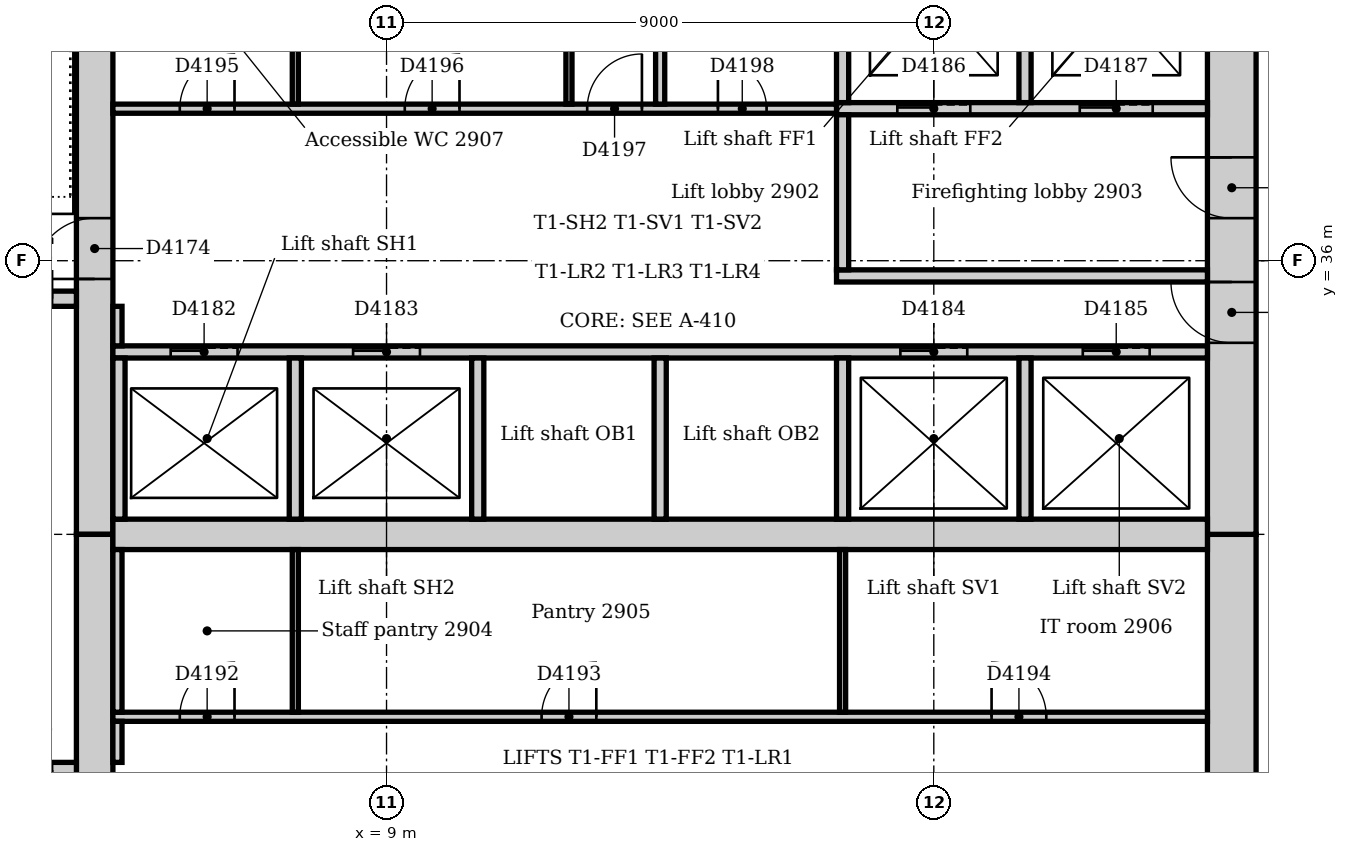
"""IFC4 building model, lengths in metres.
Left out: names, types, materials, properties, quantities, classifications, styles, units other than length and angle.
Written with IfcOpenShell. Run it as: python <this file> out.ifc"""

import sys

from ifc_helpers import new_model, si_unit, direction, frame, frame_2d, origin, place, context, subcontext, project, spatial, rectangle, extrude, element, fill, save


model = new_model("IFC4")
c1 = context("Model", 3, precision=1e-05, world=origin(), true_north=direction((0.0, 1.0)))
c2 = subcontext(c1, "Body", "Model", "MODEL_VIEW")
j1 = project(units=[si_unit("LENGTHUNIT", "METRE"), si_unit("PLANEANGLEUNIT", "RADIAN")], contexts=[c1])
p1 = place(None, origin())
s1 = spatial("IfcSite", under=j1, at=p1, CompositionType="ELEMENT")
p2 = place(p1, origin())
s2 = spatial("IfcBuilding", under=s1, at=p2, CompositionType="ELEMENT")
p3 = place(p2, frame((0.0, 0.0, 124.0)))
s3 = spatial("IfcBuildingStorey", under=s2, at=p3, CompositionType="ELEMENT", Elevation=124.0)
p4 = place(p3, frame((22.9, 21.0, 0.0), z_axis=(0.0, 0.0, 1.0), x_axis=(0.0, 1.0, 0.0)))
e1 = element("IfcWall", 1, at=p4, inside=s3, PredefinedType="SOLIDWALL", context=c2, shape_type="SweptSolid", body=[
    extrude(rectangle(XDim=10.5, YDim=0.8, at=frame_2d((5.25, 0.0))), origin(), (0.0, 0.0, 1.0), 4.0),
])
p5 = place(p4, frame((4.35, 0.0, 0.0)))
e2 = element("IfcOpeningElement", 2, at=p5, cuts=e1, PredefinedType="OPENING", context=c2, shape_type="SweptSolid", body=[
    extrude(rectangle(XDim=1.8, YDim=2.1, at=frame_2d((0.9, 1.05))), frame((0.0, 0.41, 0.0), z_axis=(0.0, -1.0, 0.0), x_axis=(1.0, 0.0, 0.0)), (0.0, 0.0, 1.0), 0.82),
])
p6 = place(p3, frame((22.9, 31.5, 0.0), z_axis=(0.0, 0.0, 1.0), x_axis=(0.0, 1.0, 0.0)))
e3 = element("IfcWall", 3, at=p6, inside=s3, PredefinedType="SOLIDWALL", context=c2, shape_type="SweptSolid", body=[
    extrude(rectangle(XDim=10.5, YDim=0.8, at=frame_2d((5.25, 0.0))), origin(), (0.0, 0.0, 1.0), 4.0),
])
p7 = place(p6, frame((3.15, 0.0, 0.0)))
e4 = element("IfcOpeningElement", 4, at=p7, cuts=e3, PredefinedType="OPENING", context=c2, shape_type="SweptSolid", body=[
    extrude(rectangle(XDim=1.0, YDim=2.1, at=frame_2d((0.5, 1.05))), frame((0.0, 0.41, 0.0), z_axis=(0.0, -1.0, 0.0), x_axis=(1.0, 0.0, 0.0)), (0.0, 0.0, 1.0), 0.82),
])
p8 = place(p6, frame((5.2, 0.0, 0.0)))
e5 = element("IfcOpeningElement", 5, at=p8, cuts=e3, PredefinedType="OPENING", context=c2, shape_type="SweptSolid", body=[
    extrude(rectangle(XDim=1.0, YDim=2.1, at=frame_2d((0.5, 1.05))), frame((0.0, 0.41, 0.0), z_axis=(0.0, -1.0, 0.0), x_axis=(1.0, 0.0, 0.0)), (0.0, 0.0, 1.0), 0.82),
])
p9 = place(p3, frame((4.2, 42.0, 0.0), z_axis=(0.0, 0.0, 1.0), x_axis=(0.0, -1.0, 0.0)))
e6 = element("IfcWall", 6, at=p9, inside=s3, PredefinedType="SOLIDWALL", context=c2, shape_type="SweptSolid", body=[
    extrude(rectangle(XDim=10.5, YDim=0.6, at=frame_2d((5.25, 0.0))), origin(), (0.0, 0.0, 1.0), 4.0),
])
p10 = place(p9, frame((5.3, 0.0, 0.0)))
e7 = element("IfcOpeningElement", 7, at=p10, cuts=e6, PredefinedType="OPENING", context=c2, shape_type="SweptSolid", body=[
    extrude(rectangle(XDim=1.0, YDim=2.1, at=frame_2d((0.5, 1.05))), frame((0.0, 0.31, 0.0), z_axis=(0.0, -1.0, 0.0), x_axis=(1.0, 0.0, 0.0)), (0.0, 0.0, 1.0), 0.62),
])
p11 = place(p3, frame((4.2, 31.5, 0.0), z_axis=(0.0, 0.0, 1.0), x_axis=(0.0, -1.0, 0.0)))
e8 = element("IfcWall", 8, at=p11, inside=s3, PredefinedType="SOLIDWALL", context=c2, shape_type="SweptSolid", body=[
    extrude(rectangle(XDim=10.5, YDim=0.6, at=frame_2d((5.25, 0.0))), origin(), (0.0, 0.0, 1.0), 4.0),
])
p12 = place(p11, frame((4.25, 0.0, 0.0)))
e9 = element("IfcOpeningElement", 9, at=p12, cuts=e8, PredefinedType="OPENING", context=c2, shape_type="SweptSolid", body=[
    extrude(rectangle(XDim=1.0, YDim=2.1, at=frame_2d((0.5, 1.05))), frame((0.0, 0.31, 0.0), z_axis=(0.0, -1.0, 0.0), x_axis=(1.0, 0.0, 0.0)), (0.0, 0.0, 1.0), 0.62),
])
p13 = place(p3, frame((4.5, 31.5, 0.0), z_axis=(0.0, 0.0, 1.0), x_axis=(1.0, 0.0, 0.0)))
e10 = element("IfcWall", 10, at=p13, inside=s3, PredefinedType="SOLIDWALL", context=c2, shape_type="SweptSolid", body=[
    extrude(rectangle(XDim=18.0, YDim=0.5, at=frame_2d((9.0, 0.0))), origin(), (0.0, 0.0, 1.0), 4.0),
])
p14 = place(p3, frame((3.9, 27.625, 0.0), z_axis=(0.0, 0.0, 1.0), x_axis=(-1.0, 0.0, 0.0)))
e11 = element("IfcWall", 11, at=p14, inside=s3, PredefinedType="SOLIDWALL", context=c2, shape_type="SweptSolid", body=[
    extrude(rectangle(XDim=3.54, YDim=0.25, at=frame_2d((1.77, 0.0))), origin(), (0.0, 0.0, 1.0), 4.0),
])
p15 = place(p14, frame((0.4, 0.0, 0.0)))
e12 = element("IfcOpeningElement", 12, at=p15, cuts=e11, PredefinedType="OPENING", context=c2, shape_type="SweptSolid", body=[
    extrude(rectangle(XDim=1.0, YDim=2.1, at=frame_2d((0.5, 1.05))), frame((0.0, 0.135, 0.0), z_axis=(0.0, -1.0, 0.0), x_axis=(1.0, 0.0, 0.0)), (0.0, 0.0, 1.0), 0.27),
])
p16 = place(p3, frame((0.36, 35.375, 0.0), z_axis=(0.0, 0.0, 1.0), x_axis=(1.0, 0.0, 0.0)))
e13 = element("IfcWall", 13, at=p16, inside=s3, PredefinedType="SOLIDWALL", context=c2, shape_type="SweptSolid", body=[
    extrude(rectangle(XDim=3.54, YDim=0.25, at=frame_2d((1.77, 0.0))), origin(), (0.0, 0.0, 1.0), 4.0),
])
p17 = place(p16, frame((2.14, 0.0, 0.0)))
e14 = element("IfcOpeningElement", 14, at=p17, cuts=e13, PredefinedType="OPENING", context=c2, shape_type="SweptSolid", body=[
    extrude(rectangle(XDim=1.0, YDim=2.1, at=frame_2d((0.5, 1.05))), frame((0.0, 0.135, 0.0), z_axis=(0.0, -1.0, 0.0), x_axis=(1.0, 0.0, 0.0)), (0.0, 0.0, 1.0), 0.27),
])
p18 = place(p3, frame((16.4, 35.75, 0.0), z_axis=(0.0, 0.0, 1.0), x_axis=(1.0, 0.0, 0.0)))
e15 = element("IfcWall", 15, at=p18, inside=s3, PredefinedType="PARTITIONING", context=c2, shape_type="SweptSolid", body=[
    extrude(rectangle(XDim=6.1, YDim=0.2, at=frame_2d((3.05, 0.0))), origin(), (0.0, 0.0, 1.0), 3.85),
])
p19 = place(p3, frame((16.4, 38.5, 0.0), z_axis=(0.0, 0.0, 1.0), x_axis=(1.0, 0.0, 0.0)))
e16 = element("IfcWall", 16, at=p19, inside=s3, PredefinedType="PARTITIONING", context=c2, shape_type="SweptSolid", body=[
    extrude(rectangle(XDim=6.1, YDim=0.2, at=frame_2d((3.05, 0.0))), origin(), (0.0, 0.0, 1.0), 3.85),
])
p20 = place(p19, frame((1.0, 0.0, 0.0)))
e17 = element("IfcOpeningElement", 17, at=p20, cuts=e16, PredefinedType="OPENING", context=c2, shape_type="SweptSolid", body=[
    extrude(rectangle(XDim=1.2, YDim=2.1, at=frame_2d((0.6, 1.05))), frame((0.0, 0.11, 0.0), z_axis=(0.0, -1.0, 0.0), x_axis=(1.0, 0.0, 0.0)), (0.0, 0.0, 1.0), 0.22),
])
p21 = place(p19, frame((4.0, 0.0, 0.0)))
e18 = element("IfcOpeningElement", 18, at=p21, cuts=e16, PredefinedType="OPENING", context=c2, shape_type="SweptSolid", body=[
    extrude(rectangle(XDim=1.2, YDim=2.1, at=frame_2d((0.6, 1.05))), frame((0.0, 0.11, 0.0), z_axis=(0.0, -1.0, 0.0), x_axis=(1.0, 0.0, 0.0)), (0.0, 0.0, 1.0), 0.22),
])
p22 = place(p3, frame((16.5, 35.85, 0.0), z_axis=(0.0, 0.0, 1.0), x_axis=(0.0, 1.0, 0.0)))
e19 = element("IfcWall", 19, at=p22, inside=s3, PredefinedType="PARTITIONING", context=c2, shape_type="SweptSolid", body=[
    extrude(rectangle(XDim=2.55, YDim=0.2, at=frame_2d((1.275, 0.0))), origin(), (0.0, 0.0, 1.0), 3.85),
])
p23 = place(p3, frame((4.5, 34.5, 0.0), z_axis=(0.0, 0.0, 1.0), x_axis=(1.0, 0.0, 0.0)))
e20 = element("IfcWall", 20, at=p23, inside=s3, PredefinedType="PARTITIONING", context=c2, shape_type="SweptSolid", body=[
    extrude(rectangle(XDim=18.0, YDim=0.2, at=frame_2d((9.0, 0.0))), origin(), (0.0, 0.0, 1.0), 3.85),
])
p24 = place(p23, frame((0.95, 0.0, 0.0)))
e21 = element("IfcOpeningElement", 21, at=p24, cuts=e20, PredefinedType="OPENING", context=c2, shape_type="SweptSolid", body=[
    extrude(rectangle(XDim=1.1, YDim=2.1, at=frame_2d((0.55, 1.05))), frame((0.0, 0.11, 0.0), z_axis=(0.0, -1.0, 0.0), x_axis=(1.0, 0.0, 0.0)), (0.0, 0.0, 1.0), 0.22),
])
p25 = place(p23, frame((3.95, 0.0, 0.0)))
e22 = element("IfcOpeningElement", 22, at=p25, cuts=e20, PredefinedType="OPENING", context=c2, shape_type="SweptSolid", body=[
    extrude(rectangle(XDim=1.1, YDim=2.1, at=frame_2d((0.55, 1.05))), frame((0.0, 0.11, 0.0), z_axis=(0.0, -1.0, 0.0), x_axis=(1.0, 0.0, 0.0)), (0.0, 0.0, 1.0), 0.22),
])
p26 = place(p23, frame((12.95, 0.0, 0.0)))
e23 = element("IfcOpeningElement", 23, at=p26, cuts=e20, PredefinedType="OPENING", context=c2, shape_type="SweptSolid", body=[
    extrude(rectangle(XDim=1.1, YDim=2.1, at=frame_2d((0.55, 1.05))), frame((0.0, 0.11, 0.0), z_axis=(0.0, -1.0, 0.0), x_axis=(1.0, 0.0, 0.0)), (0.0, 0.0, 1.0), 0.22),
])
p27 = place(p23, frame((15.95, 0.0, 0.0)))
e24 = element("IfcOpeningElement", 24, at=p27, cuts=e20, PredefinedType="OPENING", context=c2, shape_type="SweptSolid", body=[
    extrude(rectangle(XDim=1.1, YDim=2.1, at=frame_2d((0.55, 1.05))), frame((0.0, 0.11, 0.0), z_axis=(0.0, -1.0, 0.0), x_axis=(1.0, 0.0, 0.0)), (0.0, 0.0, 1.0), 0.22),
])
for number, where, z_axis, x_axis in (
    (25, (16.5, 38.6, 0.0), (0.0, 0.0, 1.0), (0.0, 1.0, 0.0)),
    (26, (19.5, 38.6, 0.0), (0.0, 0.0, 1.0), (0.0, 1.0, 0.0)),
):
    element("IfcWall", number, at=place(p3, frame(where, z_axis=z_axis, x_axis=x_axis)), inside=s3, PredefinedType="PARTITIONING", context=c2, shape_type="SweptSolid", body=[
        extrude(rectangle(XDim=3.4, YDim=0.2, at=frame_2d((1.7, 0.0))), origin(), (0.0, 0.0, 1.0), 3.85),
    ])
for number, where, z_axis, x_axis in (
    (27, (4.6, 31.75, 0.0), (0.0, 0.0, 1.0), (0.0, 1.0, 0.0)),
    (28, (7.5, 31.75, 0.0), (0.0, 0.0, 1.0), (0.0, 1.0, 0.0)),
    (29, (10.5, 31.75, 0.0), (0.0, 0.0, 1.0), (0.0, 1.0, 0.0)),
    (30, (13.5, 31.75, 0.0), (0.0, 0.0, 1.0), (0.0, 1.0, 0.0)),
    (31, (16.5, 31.75, 0.0), (0.0, 0.0, 1.0), (0.0, 1.0, 0.0)),
    (32, (19.5, 31.75, 0.0), (0.0, 0.0, 1.0), (0.0, 1.0, 0.0)),
):
    element("IfcWall", number, at=place(p3, frame(where, z_axis=z_axis, x_axis=x_axis)), inside=s3, PredefinedType="PARTITIONING", context=c2, shape_type="SweptSolid", body=[
        extrude(rectangle(XDim=2.65, YDim=0.2, at=frame_2d((1.325, 0.0))), origin(), (0.0, 0.0, 1.0), 3.85),
    ])
p28 = place(p3, frame((4.5, 28.5, 0.0), z_axis=(0.0, 0.0, 1.0), x_axis=(1.0, 0.0, 0.0)))
e33 = element("IfcWall", 33, at=p28, inside=s3, PredefinedType="PARTITIONING", context=c2, shape_type="SweptSolid", body=[
    extrude(rectangle(XDim=18.0, YDim=0.15, at=frame_2d((9.0, 0.0))), origin(), (0.0, 0.0, 1.0), 3.85),
])
p29 = place(p28, frame((1.1, 0.0, 0.0)))
e34 = element("IfcOpeningElement", 34, at=p29, cuts=e33, PredefinedType="OPENING", context=c2, shape_type="SweptSolid", body=[
    extrude(rectangle(XDim=0.9, YDim=2.1, at=frame_2d((0.45, 1.05))), frame((0.0, 0.085, 0.0), z_axis=(0.0, -1.0, 0.0), x_axis=(1.0, 0.0, 0.0)), (0.0, 0.0, 1.0), 0.17),
])
p30 = place(p28, frame((7.05, 0.0, 0.0)))
e35 = element("IfcOpeningElement", 35, at=p30, cuts=e33, PredefinedType="OPENING", context=c2, shape_type="SweptSolid", body=[
    extrude(rectangle(XDim=0.9, YDim=2.1, at=frame_2d((0.45, 1.05))), frame((0.0, 0.085, 0.0), z_axis=(0.0, -1.0, 0.0), x_axis=(1.0, 0.0, 0.0)), (0.0, 0.0, 1.0), 0.17),
])
p31 = place(p28, frame((14.45, 0.0, 0.0)))
e36 = element("IfcOpeningElement", 36, at=p31, cuts=e33, PredefinedType="OPENING", context=c2, shape_type="SweptSolid", body=[
    extrude(rectangle(XDim=0.9, YDim=2.1, at=frame_2d((0.45, 1.05))), frame((0.0, 0.085, 0.0), z_axis=(0.0, -1.0, 0.0), x_axis=(1.0, 0.0, 0.0)), (0.0, 0.0, 1.0), 0.17),
])
p32 = place(p3, frame((4.5, 38.5, 0.0), z_axis=(0.0, 0.0, 1.0), x_axis=(1.0, 0.0, 0.0)))
e37 = element("IfcWall", 37, at=p32, inside=s3, PredefinedType="PARTITIONING", context=c2, shape_type="SweptSolid", body=[
    extrude(rectangle(XDim=11.9, YDim=0.15, at=frame_2d((5.95, 0.0))), origin(), (0.0, 0.0, 1.0), 3.85),
])
p33 = place(p32, frame((1.1, 0.0, 0.0)))
e38 = element("IfcOpeningElement", 38, at=p33, cuts=e37, PredefinedType="OPENING", context=c2, shape_type="SweptSolid", body=[
    extrude(rectangle(XDim=0.9, YDim=2.1, at=frame_2d((0.45, 1.05))), frame((0.0, 0.085, 0.0), z_axis=(0.0, -1.0, 0.0), x_axis=(1.0, 0.0, 0.0)), (0.0, 0.0, 1.0), 0.17),
])
p34 = place(p32, frame((4.8, 0.0, 0.0)))
e39 = element("IfcOpeningElement", 39, at=p34, cuts=e37, PredefinedType="OPENING", context=c2, shape_type="SweptSolid", body=[
    extrude(rectangle(XDim=0.9, YDim=2.1, at=frame_2d((0.45, 1.05))), frame((0.0, 0.085, 0.0), z_axis=(0.0, -1.0, 0.0), x_axis=(1.0, 0.0, 0.0)), (0.0, 0.0, 1.0), 0.17),
])
p35 = place(p32, frame((7.8, 0.0, 0.0)))
e40 = element("IfcOpeningElement", 40, at=p35, cuts=e37, PredefinedType="OPENING", context=c2, shape_type="SweptSolid", body=[
    extrude(rectangle(XDim=0.9, YDim=2.1, at=frame_2d((0.45, 1.05))), frame((0.0, 0.085, 0.0), z_axis=(0.0, -1.0, 0.0), x_axis=(1.0, 0.0, 0.0)), (0.0, 0.0, 1.0), 0.17),
])
p36 = place(p32, frame((9.95, 0.0, 0.0)))
e41 = element("IfcOpeningElement", 41, at=p36, cuts=e37, PredefinedType="OPENING", context=c2, shape_type="SweptSolid", body=[
    extrude(rectangle(XDim=0.8, YDim=2.1, at=frame_2d((0.4, 1.05))), frame((0.0, 0.085, 0.0), z_axis=(0.0, -1.0, 0.0), x_axis=(1.0, 0.0, 0.0)), (0.0, 0.0, 1.0), 0.17),
])
p37 = place(p3, frame((4.575, 27.75, 0.0), z_axis=(0.0, 0.0, 1.0), x_axis=(0.0, 1.0, 0.0)))
e42 = element("IfcWall", 42, at=p37, inside=s3, PredefinedType="PARTITIONING", context=c2, shape_type="SweptSolid", body=[
    extrude(rectangle(XDim=0.675, YDim=0.15, at=frame_2d((0.338, 0.0))), origin(), (0.0, 0.0, 1.0), 3.85),
])
p38 = place(p3, frame((4.575, 28.575, 0.0), z_axis=(0.0, 0.0, 1.0), x_axis=(0.0, 1.0, 0.0)))
e43 = element("IfcWall", 43, at=p38, inside=s3, PredefinedType="PARTITIONING", context=c2, shape_type="SweptSolid", body=[
    extrude(rectangle(XDim=2.675, YDim=0.15, at=frame_2d((1.337, 0.0))), origin(), (0.0, 0.0, 1.0), 3.85),
])
p39 = place(p3, frame((4.575, 34.6, 0.0), z_axis=(0.0, 0.0, 1.0), x_axis=(0.0, 1.0, 0.0)))
e44 = element("IfcWall", 44, at=p39, inside=s3, PredefinedType="PARTITIONING", context=c2, shape_type="SweptSolid", body=[
    extrude(rectangle(XDim=0.65, YDim=0.15, at=frame_2d((0.325, 0.0))), origin(), (0.0, 0.0, 1.0), 3.85),
])
p40 = place(p3, frame((13.5, 38.575, 0.0), z_axis=(0.0, 0.0, 1.0), x_axis=(0.0, 1.0, 0.0)))
e45 = element("IfcWall", 45, at=p40, inside=s3, PredefinedType="PARTITIONING", context=c2, shape_type="SweptSolid", body=[
    extrude(rectangle(XDim=3.425, YDim=0.15, at=frame_2d((1.712, 0.0))), origin(), (0.0, 0.0, 1.0), 3.85),
])
for number, where, z_axis, x_axis in (
    (46, (7.5, 38.575, 0.0), (0.0, 0.0, 1.0), (0.0, 1.0, 0.0)),
    (47, (12.0, 38.575, 0.0), (0.0, 0.0, 1.0), (0.0, 1.0, 0.0)),
):
    element("IfcWall", number, at=place(p3, frame(where, z_axis=z_axis, x_axis=x_axis)), inside=s3, PredefinedType="PARTITIONING", context=c2, shape_type="SweptSolid", body=[
        extrude(rectangle(XDim=3.425, YDim=0.1, at=frame_2d((1.712, 0.0))), origin(), (0.0, 0.0, 1.0), 3.85),
    ])
for number, where, z_axis, x_axis in (
    (48, (7.5, 28.575, 0.0), (0.0, 0.0, 1.0), (0.0, 1.0, 0.0)),
    (49, (16.5, 28.575, 0.0), (0.0, 0.0, 1.0), (0.0, 1.0, 0.0)),
):
    element("IfcWall", number, at=place(p3, frame(where, z_axis=z_axis, x_axis=x_axis)), inside=s3, PredefinedType="PARTITIONING", context=c2, shape_type="SweptSolid", body=[
        extrude(rectangle(XDim=2.675, YDim=0.1, at=frame_2d((1.337, 0.0))), origin(), (0.0, 0.0, 1.0), 3.85),
    ])
p41 = place(p10, frame((1.0, 0.0, 0.0), z_axis=(0.0, 0.0, 1.0), x_axis=(-1.0, 0.0, 0.0)))
e50 = element("IfcDoor", 50, at=p41, inside=s3, OperationType="SINGLE_SWING_LEFT", PredefinedType="DOOR", context=c2, shape_type="SweptSolid", body=[
    extrude(rectangle(XDim=1.0, YDim=2.1, at=frame_2d((0.5, 1.05))), frame((0.0, 0.025, 0.0), z_axis=(0.0, -1.0, 0.0), x_axis=(1.0, 0.0, 0.0)), (0.0, 0.0, 1.0), 0.05),
])
fill(e7, e50)
p42 = place(p24, origin())
e51 = element("IfcDoor", 51, at=p42, inside=s3, OperationType="SLIDING_TO_LEFT", PredefinedType="DOOR", context=c2, shape_type="SweptSolid", body=[
    extrude(rectangle(XDim=1.1, YDim=2.1, at=frame_2d((0.55, 1.05))), frame((0.0, 0.025, 0.0), z_axis=(0.0, -1.0, 0.0), x_axis=(1.0, 0.0, 0.0)), (0.0, 0.0, 1.0), 0.05),
])
fill(e21, e51)
p43 = place(p25, origin())
e52 = element("IfcDoor", 52, at=p43, inside=s3, OperationType="SLIDING_TO_LEFT", PredefinedType="DOOR", context=c2, shape_type="SweptSolid", body=[
    extrude(rectangle(XDim=1.1, YDim=2.1, at=frame_2d((0.55, 1.05))), frame((0.0, 0.025, 0.0), z_axis=(0.0, -1.0, 0.0), x_axis=(1.0, 0.0, 0.0)), (0.0, 0.0, 1.0), 0.05),
])
fill(e22, e52)
p44 = place(p26, origin())
e53 = element("IfcDoor", 53, at=p44, inside=s3, OperationType="SLIDING_TO_LEFT", PredefinedType="DOOR", context=c2, shape_type="SweptSolid", body=[
    extrude(rectangle(XDim=1.1, YDim=2.1, at=frame_2d((0.55, 1.05))), frame((0.0, 0.025, 0.0), z_axis=(0.0, -1.0, 0.0), x_axis=(1.0, 0.0, 0.0)), (0.0, 0.0, 1.0), 0.05),
])
fill(e23, e53)
p45 = place(p27, origin())
e54 = element("IfcDoor", 54, at=p45, inside=s3, OperationType="SLIDING_TO_LEFT", PredefinedType="DOOR", context=c2, shape_type="SweptSolid", body=[
    extrude(rectangle(XDim=1.1, YDim=2.1, at=frame_2d((0.55, 1.05))), frame((0.0, 0.025, 0.0), z_axis=(0.0, -1.0, 0.0), x_axis=(1.0, 0.0, 0.0)), (0.0, 0.0, 1.0), 0.05),
])
fill(e24, e54)
p46 = place(p20, origin())
e55 = element("IfcDoor", 55, at=p46, inside=s3, OperationType="SLIDING_TO_LEFT", PredefinedType="DOOR", context=c2, shape_type="SweptSolid", body=[
    extrude(rectangle(XDim=1.2, YDim=2.1, at=frame_2d((0.6, 1.05))), frame((0.0, 0.025, 0.0), z_axis=(0.0, -1.0, 0.0), x_axis=(1.0, 0.0, 0.0)), (0.0, 0.0, 1.0), 0.05),
])
fill(e17, e55)
p47 = place(p21, origin())
e56 = element("IfcDoor", 56, at=p47, inside=s3, OperationType="SLIDING_TO_LEFT", PredefinedType="DOOR", context=c2, shape_type="SweptSolid", body=[
    extrude(rectangle(XDim=1.2, YDim=2.1, at=frame_2d((0.6, 1.05))), frame((0.0, 0.025, 0.0), z_axis=(0.0, -1.0, 0.0), x_axis=(1.0, 0.0, 0.0)), (0.0, 0.0, 1.0), 0.05),
])
fill(e18, e56)
p48 = place(p7, origin())
e57 = element("IfcDoor", 57, at=p48, inside=s3, OperationType="SINGLE_SWING_RIGHT", PredefinedType="DOOR", context=c2, shape_type="SweptSolid", body=[
    extrude(rectangle(XDim=1.0, YDim=2.1, at=frame_2d((0.5, 1.05))), frame((0.0, 0.025, 0.0), z_axis=(0.0, -1.0, 0.0), x_axis=(1.0, 0.0, 0.0)), (0.0, 0.0, 1.0), 0.05),
])
fill(e4, e57)
p49 = place(p8, origin())
e58 = element("IfcDoor", 58, at=p49, inside=s3, OperationType="SINGLE_SWING_RIGHT", PredefinedType="DOOR", context=c2, shape_type="SweptSolid", body=[
    extrude(rectangle(XDim=1.0, YDim=2.1, at=frame_2d((0.5, 1.05))), frame((0.0, 0.025, 0.0), z_axis=(0.0, -1.0, 0.0), x_axis=(1.0, 0.0, 0.0)), (0.0, 0.0, 1.0), 0.05),
])
fill(e5, e58)
p50 = place(p29, origin())
e59 = element("IfcDoor", 59, at=p50, inside=s3, OperationType="SINGLE_SWING_RIGHT", PredefinedType="DOOR", context=c2, shape_type="SweptSolid", body=[
    extrude(rectangle(XDim=0.9, YDim=2.1, at=frame_2d((0.45, 1.05))), frame((0.0, 0.025, 0.0), z_axis=(0.0, -1.0, 0.0), x_axis=(1.0, 0.0, 0.0)), (0.0, 0.0, 1.0), 0.05),
])
fill(e34, e59)
p51 = place(p30, origin())
e60 = element("IfcDoor", 60, at=p51, inside=s3, OperationType="SINGLE_SWING_RIGHT", PredefinedType="DOOR", context=c2, shape_type="SweptSolid", body=[
    extrude(rectangle(XDim=0.9, YDim=2.1, at=frame_2d((0.45, 1.05))), frame((0.0, 0.025, 0.0), z_axis=(0.0, -1.0, 0.0), x_axis=(1.0, 0.0, 0.0)), (0.0, 0.0, 1.0), 0.05),
])
fill(e35, e60)
p52 = place(p31, origin())
e61 = element("IfcDoor", 61, at=p52, inside=s3, OperationType="SINGLE_SWING_LEFT", PredefinedType="DOOR", context=c2, shape_type="SweptSolid", body=[
    extrude(rectangle(XDim=0.9, YDim=2.1, at=frame_2d((0.45, 1.05))), frame((0.0, 0.025, 0.0), z_axis=(0.0, -1.0, 0.0), x_axis=(1.0, 0.0, 0.0)), (0.0, 0.0, 1.0), 0.05),
])
fill(e36, e61)
p53 = place(p33, origin())
e62 = element("IfcDoor", 62, at=p53, inside=s3, OperationType="SINGLE_SWING_RIGHT", PredefinedType="DOOR", context=c2, shape_type="SweptSolid", body=[
    extrude(rectangle(XDim=0.9, YDim=2.1, at=frame_2d((0.45, 1.05))), frame((0.0, 0.025, 0.0), z_axis=(0.0, -1.0, 0.0), x_axis=(1.0, 0.0, 0.0)), (0.0, 0.0, 1.0), 0.05),
])
fill(e38, e62)
p54 = place(p34, origin())
e63 = element("IfcDoor", 63, at=p54, inside=s3, OperationType="SINGLE_SWING_RIGHT", PredefinedType="DOOR", context=c2, shape_type="SweptSolid", body=[
    extrude(rectangle(XDim=0.9, YDim=2.1, at=frame_2d((0.45, 1.05))), frame((0.0, 0.025, 0.0), z_axis=(0.0, -1.0, 0.0), x_axis=(1.0, 0.0, 0.0)), (0.0, 0.0, 1.0), 0.05),
])
fill(e39, e63)
p55 = place(p35, origin())
e64 = element("IfcDoor", 64, at=p55, inside=s3, OperationType="SINGLE_SWING_RIGHT", PredefinedType="DOOR", context=c2, shape_type="SweptSolid", body=[
    extrude(rectangle(XDim=0.9, YDim=2.1, at=frame_2d((0.45, 1.05))), frame((0.0, 0.025, 0.0), z_axis=(0.0, -1.0, 0.0), x_axis=(1.0, 0.0, 0.0)), (0.0, 0.0, 1.0), 0.05),
])
fill(e40, e64)
p56 = place(p36, origin())
e65 = element("IfcDoor", 65, at=p56, inside=s3, OperationType="SINGLE_SWING_LEFT", PredefinedType="DOOR", context=c2, shape_type="SweptSolid", body=[
    extrude(rectangle(XDim=0.8, YDim=2.1, at=frame_2d((0.4, 1.05))), frame((0.0, 0.025, 0.0), z_axis=(0.0, -1.0, 0.0), x_axis=(1.0, 0.0, 0.0)), (0.0, 0.0, 1.0), 0.05),
])
fill(e41, e65)
save(model, sys.argv[1])
